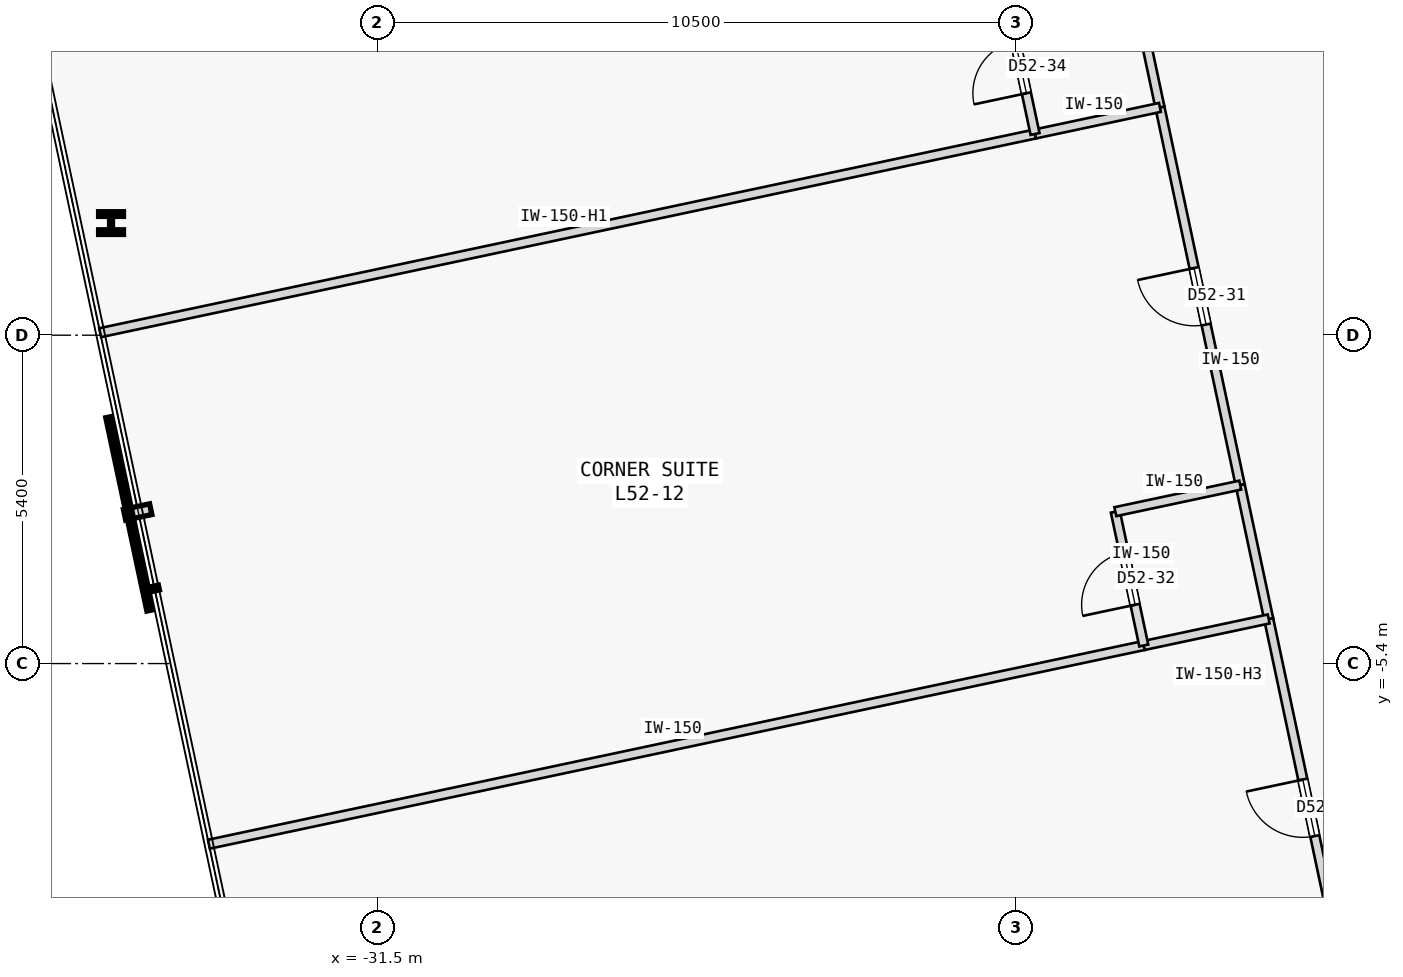
"""IFC4 building model, lengths in metres.
Left out: names, types, materials, properties, quantities, classifications, styles, units other than length and angle.
Written with IfcOpenShell. Run it as: python <this file> out.ifc"""

import sys

from ifc_helpers import new_model, si_unit, direction, frame, frame_2d, origin, origin_2d, place, context, subcontext, project, spatial, rectangle, i_section, extrude, element, fill, save


model = new_model("IFC4")
c1 = context("Model", 3, precision=1e-05, world=origin(), true_north=direction((0.0, 1.0)))
c2 = subcontext(c1, "Body", "Model", "MODEL_VIEW")
j1 = project(units=[si_unit("LENGTHUNIT", "METRE"), si_unit("PLANEANGLEUNIT", "RADIAN")], contexts=[c1])
p1 = place(None, origin())
s1 = spatial("IfcSite", under=j1, at=p1, CompositionType="ELEMENT")
p2 = place(p1, origin())
s2 = spatial("IfcBuilding", under=s1, at=p2, CompositionType="ELEMENT")
p3 = place(p2, frame((0.0, 0.0, 199.0)))
s3 = spatial("IfcBuildingStorey", under=s2, at=p3, CompositionType="ELEMENT", Elevation=199.0)
p4 = place(p3, frame((-35.883, 1.844, 0.0), z_axis=(0.0, 0.0, 1.0), x_axis=(1.0, 0.0, 0.0)))
e1 = element("IfcColumn", 1, at=p4, inside=s3, PredefinedType="COLUMN", context=c2, shape_type="SweptSolid", body=[
    extrude(i_section(OverallWidth=0.409, OverallDepth=0.374, WebThickness=0.048, FlangeThickness=0.077, FilletRadius=0.015, at=origin_2d()), origin(), (0.0, 0.0, 1.0), 3.4),
])
p5 = place(p3, frame((-15.525, -10.878, 0.0), z_axis=(0.0, 0.0, 1.0), x_axis=(-0.207887725283, 0.978152694459, 0.0)))
e2 = element("IfcWall", 2, at=p5, inside=s3, PredefinedType="PARTITIONING", context=c2, shape_type="SweptSolid", body=[
    extrude(rectangle(XDim=6.35, YDim=0.15, at=frame_2d((3.175, 0.0))), origin(), (0.0, 0.0, 1.0), 3.0),
])
p6 = place(p5, frame((2.7, 0.0, 0.0)))
e3 = element("IfcOpeningElement", 3, at=p6, cuts=e2, PredefinedType="OPENING", context=c2, shape_type="SweptSolid", body=[
    extrude(rectangle(XDim=0.95, YDim=2.15, at=frame_2d((0.475, 1.075))), frame((0.0, 0.085, 0.0), z_axis=(0.0, -1.0, 0.0), x_axis=(1.0, 0.0, 0.0)), (0.0, 0.0, 1.0), 0.17),
])
p7 = place(p3, frame((-17.313, -2.466, 0.0), z_axis=(0.0, 0.0, 1.0), x_axis=(-0.207916691923, 0.978146537703, 0.0)))
e4 = element("IfcWall", 4, at=p7, inside=s3, PredefinedType="PARTITIONING", context=c2, shape_type="SweptSolid", body=[
    extrude(rectangle(XDim=6.35, YDim=0.15, at=frame_2d((3.175, 0.0))), origin(), (0.0, 0.0, 1.0), 3.0),
])
p8 = place(p7, frame((2.7, 0.0, 0.0)))
e5 = element("IfcOpeningElement", 5, at=p8, cuts=e4, PredefinedType="OPENING", context=c2, shape_type="SweptSolid", body=[
    extrude(rectangle(XDim=0.95, YDim=2.15, at=frame_2d((0.475, 1.075))), frame((0.0, 0.085, 0.0), z_axis=(0.0, -1.0, 0.0), x_axis=(1.0, 0.0, 0.0)), (0.0, 0.0, 1.0), 0.17),
])
for number, where, z_axis, x_axis in (
    (6, (-16.845, -4.667, 0.0), (0.0, 0.0, 1.0), (-0.208, 0.978, 0.0)),
    (7, (-18.633, 3.746, 0.0), (0.0, 0.0, 1.0), (-0.208, 0.978, 0.0)),
):
    element("IfcWall", number, at=place(p3, frame(where, z_axis=z_axis, x_axis=x_axis)), inside=s3, PredefinedType="PARTITIONING", context=c2, shape_type="SweptSolid", body=[
        extrude(rectangle(XDim=2.25, YDim=0.15, at=frame_2d((1.125, 0.0))), origin(), (0.0, 0.0, 1.0), 3.0),
    ])
p9 = place(p3, frame((-34.274, -8.371, 0.0), z_axis=(0.0, 0.0, 1.0), x_axis=(0.978146137903, 0.207918572776, 0.0)))
e8 = element("IfcWall", 8, at=p9, inside=s3, PredefinedType="PARTITIONING", context=c2, shape_type="SweptSolid", body=[
    extrude(rectangle(XDim=15.718, YDim=0.15, at=frame_2d((7.859, 0.0))), origin(), (0.0, 0.0, 1.0), 3.0),
])
p10 = place(p3, frame((-18.899, -5.103, 0.0), z_axis=(0.0, 0.0, 1.0), x_axis=(0.97815826, 0.207861536591, 0.0)))
e9 = element("IfcWall", 9, at=p10, inside=s3, PredefinedType="PARTITIONING", context=c2, shape_type="SweptSolid", body=[
    extrude(rectangle(XDim=2.1, YDim=0.15, at=frame_2d((1.05, 0.0))), origin(), (0.0, 0.0, 1.0), 2.22),
])
p11 = place(p3, frame((-18.899, -5.103, 0.0), z_axis=(0.0, 0.0, 1.0), x_axis=(-0.207913264065, 0.978147266328, 0.0)))
e10 = element("IfcWall", 10, at=p11, inside=s3, PredefinedType="PARTITIONING", context=c2, shape_type="SweptSolid", body=[
    extrude(rectangle(XDim=2.25, YDim=0.15, at=frame_2d((1.125, 0.0))), origin(), (0.0, 0.0, 1.0), 3.0),
])
p12 = place(p11, frame((0.685, 0.0, 0.0)))
e11 = element("IfcOpeningElement", 11, at=p12, cuts=e10, PredefinedType="OPENING", context=c2, shape_type="SweptSolid", body=[
    extrude(rectangle(XDim=0.88, YDim=2.15, at=frame_2d((0.44, 1.075))), frame((0.0, 0.085, 0.0), z_axis=(0.0, -1.0, 0.0), x_axis=(1.0, 0.0, 0.0)), (0.0, 0.0, 1.0), 0.17),
])
p13 = place(p3, frame((-19.367, -2.902, 0.0), z_axis=(0.0, 0.0, 1.0), x_axis=(0.97815826, 0.207861536591, 0.0)))
e12 = element("IfcWall", 12, at=p13, inside=s3, PredefinedType="PARTITIONING", context=c2, shape_type="SweptSolid", body=[
    extrude(rectangle(XDim=2.1, YDim=0.15, at=frame_2d((1.05, 0.0))), origin(), (0.0, 0.0, 1.0), 3.0),
])
p14 = place(p3, frame((-36.062, 0.041, 0.0), z_axis=(0.0, 0.0, 1.0), x_axis=(0.978149296727, 0.207903711638, 0.0)))
e13 = element("IfcWall", 13, at=p14, inside=s3, PredefinedType="PARTITIONING", context=c2, shape_type="SweptSolid", body=[
    extrude(rectangle(XDim=15.718, YDim=0.15, at=frame_2d((7.859, 0.0))), origin(), (0.0, 0.0, 1.0), 2.55),
])
p15 = place(p3, frame((-20.688, 3.309, 0.0), z_axis=(0.0, 0.0, 1.0), x_axis=(0.978134617382, 0.207972763311, 0.0)))
e14 = element("IfcWall", 14, at=p15, inside=s3, PredefinedType="PARTITIONING", context=c2, shape_type="SweptSolid", body=[
    extrude(rectangle(XDim=2.1, YDim=0.15, at=frame_2d((1.05, 0.0))), origin(), (0.0, 0.0, 1.0), 3.0),
])
p16 = place(p3, frame((-20.688, 3.309, 0.0), z_axis=(0.0, 0.0, 1.0), x_axis=(-0.207891197838, 0.978151956427, 0.0)))
e15 = element("IfcWall", 15, at=p16, inside=s3, PredefinedType="PARTITIONING", context=c2, shape_type="SweptSolid", body=[
    extrude(rectangle(XDim=2.25, YDim=0.15, at=frame_2d((1.125, 0.0))), origin(), (0.0, 0.0, 1.0), 3.0),
])
p17 = place(p16, frame((0.685, 0.0, 0.0)))
e16 = element("IfcOpeningElement", 16, at=p17, cuts=e15, PredefinedType="OPENING", context=c2, shape_type="SweptSolid", body=[
    extrude(rectangle(XDim=0.88, YDim=2.15, at=frame_2d((0.44, 1.075))), frame((0.0, 0.085, 0.0), z_axis=(0.0, -1.0, 0.0), x_axis=(1.0, 0.0, 0.0)), (0.0, 0.0, 1.0), 0.17),
])
p18 = place(p6, origin())
e17 = element("IfcDoor", 17, at=p18, inside=s3, OperationType="SINGLE_SWING_RIGHT", PredefinedType="DOOR", context=c2, shape_type="SweptSolid", body=[
    extrude(rectangle(XDim=0.95, YDim=2.15, at=frame_2d((0.475, 1.075))), frame((0.0, 0.025, 0.0), z_axis=(0.0, -1.0, 0.0), x_axis=(1.0, 0.0, 0.0)), (0.0, 0.0, 1.0), 0.05),
])
fill(e3, e17)
p19 = place(p8, origin())
e18 = element("IfcDoor", 18, at=p19, inside=s3, OperationType="SINGLE_SWING_RIGHT", PredefinedType="DOOR", context=c2, shape_type="SweptSolid", body=[
    extrude(rectangle(XDim=0.95, YDim=2.15, at=frame_2d((0.475, 1.075))), frame((0.0, 0.025, 0.0), z_axis=(0.0, -1.0, 0.0), x_axis=(1.0, 0.0, 0.0)), (0.0, 0.0, 1.0), 0.05),
])
fill(e5, e18)
p20 = place(p12, origin())
e19 = element("IfcDoor", 19, at=p20, inside=s3, OperationType="SINGLE_SWING_LEFT", PredefinedType="DOOR", context=c2, shape_type="SweptSolid", body=[
    extrude(rectangle(XDim=0.88, YDim=2.15, at=frame_2d((0.44, 1.075))), frame((0.0, 0.025, 0.0), z_axis=(0.0, -1.0, 0.0), x_axis=(1.0, 0.0, 0.0)), (0.0, 0.0, 1.0), 0.05),
])
fill(e11, e19)
p21 = place(p17, origin())
e20 = element("IfcDoor", 20, at=p21, inside=s3, OperationType="SINGLE_SWING_LEFT", PredefinedType="DOOR", context=c2, shape_type="SweptSolid", body=[
    extrude(rectangle(XDim=0.88, YDim=2.15, at=frame_2d((0.44, 1.075))), frame((0.0, 0.025, 0.0), z_axis=(0.0, -1.0, 0.0), x_axis=(1.0, 0.0, 0.0)), (0.0, 0.0, 1.0), 0.05),
])
fill(e16, e20)
save(model, sys.argv[1])
